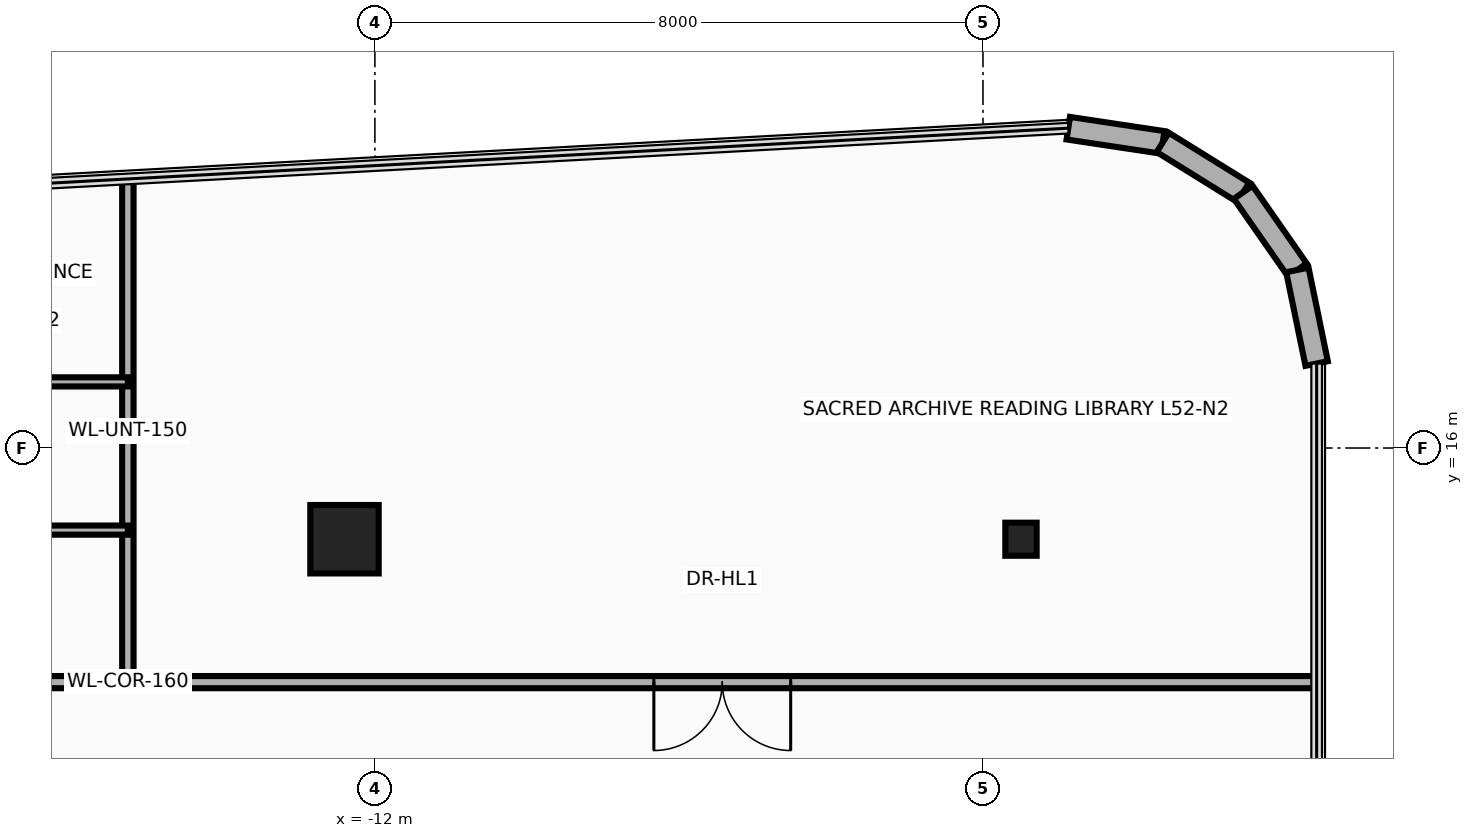
"""IFC4 building model, lengths in metres.
Left out: names, types, materials, properties, quantities, classifications, styles, units other than length and angle.
Written with IfcOpenShell. Run it as: python <this file> out.ifc"""

import sys

from ifc_helpers import new_model, si_unit, direction, frame, frame_2d, origin, origin_2d, place, context, subcontext, project, spatial, rectangle, i_section, extrude, source, transform, mapped, element, fill, save


model = new_model("IFC4")
c1 = context("Model", 3, precision=1e-05, world=origin(), true_north=direction((0.0, 1.0)))
c2 = subcontext(c1, "Body", "Model", "MODEL_VIEW")
j1 = project(units=[si_unit("LENGTHUNIT", "METRE"), si_unit("PLANEANGLEUNIT", "RADIAN")], contexts=[c1])
p1 = place(None, origin())
s1 = spatial("IfcSite", under=j1, at=p1, CompositionType="ELEMENT")
p2 = place(p1, origin())
s2 = spatial("IfcBuilding", under=s1, at=p2, CompositionType="ELEMENT")
p3 = place(p2, frame((0.0, 0.0, 205.5)))
s3 = spatial("IfcBuildingStorey", under=s2, at=p3, CompositionType="ELEMENT", Elevation=205.5)
m1 = source(origin(), c2, "Body", "SweptSolid", [
    extrude(rectangle(XDim=0.9, YDim=0.9, at=origin_2d()), origin(), (0.0, 0.0, 1.0), 3.5),
])
p4 = place(p3, frame((-12.4, 14.8, 0.0), z_axis=(0.0, 0.0, 1.0), x_axis=(1.0, 0.0, 0.0)))
e1 = element("IfcColumn", 1, at=p4, inside=s3, PredefinedType="COLUMN", context=c2, shape_type="MappedRepresentation", body=[
    mapped(m1, transform((0.0, 0.0, 0.0), x_axis=(1.0, 0.0, 0.0), y_axis=(0.0, 1.0, 0.0), z_axis=(0.0, 0.0, 1.0), scale=1.0)),
])
m2 = source(origin(), c2, "Body", "SweptSolid", [
    extrude(i_section(OverallWidth=0.412, OverallDepth=0.435, WebThickness=0.036, FlangeThickness=0.057, at=origin_2d()), origin(), (0.0, 0.0, 1.0), 3.5),
])
p5 = place(p3, frame((-3.5, 14.8, 0.0), z_axis=(0.0, 0.0, 1.0), x_axis=(1.0, 0.0, 0.0)))
e2 = element("IfcColumn", 2, at=p5, inside=s3, PredefinedType="COLUMN", context=c2, shape_type="MappedRepresentation", body=[
    mapped(m2, transform((0.0, 0.0, 0.0), x_axis=(1.0, 0.0, 0.0), y_axis=(0.0, 1.0, 0.0), z_axis=(0.0, 0.0, 1.0), scale=1.0)),
])
p6 = place(p3, frame((-2.878, 20.208, 0.0), z_axis=(0.0, 0.0, 1.0), x_axis=(0.988902138571, -0.148568369208, 0.0)))
e3 = element("IfcWall", 3, at=p6, inside=s3, PredefinedType="SOLIDWALL", context=c2, shape_type="SweptSolid", body=[
    extrude(rectangle(XDim=1.257, YDim=0.3, at=frame_2d((0.628, 0.0))), origin(), (0.0, 0.0, 1.0), 3.26),
])
p7 = place(p3, frame((-1.635, 20.021, 0.0), z_axis=(0.0, 0.0, 1.0), x_axis=(0.849646224094, -0.52735310171, 0.0)))
e4 = element("IfcWall", 4, at=p7, inside=s3, PredefinedType="SOLIDWALL", context=c2, shape_type="SweptSolid", body=[
    extrude(rectangle(XDim=1.245, YDim=0.3, at=frame_2d((0.623, 0.0))), origin(), (0.0, 0.0, 1.0), 3.26),
])
p8 = place(p3, frame((-0.576, 19.364, 0.0), z_axis=(0.0, 0.0, 1.0), x_axis=(0.572304219931, -0.820041389107, 0.0)))
e5 = element("IfcWall", 5, at=p8, inside=s3, PredefinedType="SOLIDWALL", context=c2, shape_type="SweptSolid", body=[
    extrude(rectangle(XDim=1.246, YDim=0.3, at=frame_2d((0.623, 0.0))), origin(), (0.0, 0.0, 1.0), 3.26),
])
p9 = place(p3, frame((0.136, 18.343, 0.0), z_axis=(0.0, 0.0, 1.0), x_axis=(0.201603599025, -0.979467196419, 0.0)))
e6 = element("IfcWall", 6, at=p9, inside=s3, PredefinedType="SOLIDWALL", context=c2, shape_type="SweptSolid", body=[
    extrude(rectangle(XDim=1.257, YDim=0.3, at=frame_2d((0.628, 0.0))), origin(), (0.0, 0.0, 1.0), 3.26),
])
p10 = place(p3, frame((-30.89, 12.92, 0.0), z_axis=(0.0, 0.0, 1.0), x_axis=(1.0, 0.0, 0.0)))
e7 = element("IfcWall", 7, at=p10, inside=s3, PredefinedType="PARTITIONING", context=c2, shape_type="SweptSolid", body=[
    extrude(rectangle(XDim=31.28, YDim=0.16, at=frame_2d((15.64, 0.0))), origin(), (0.0, 0.0, 1.0), 2.634),
])
p11 = place(p10, frame((2.347, 0.0, 0.0)))
e8 = element("IfcOpeningElement", 8, at=p11, cuts=e7, PredefinedType="OPENING", context=c2, shape_type="SweptSolid", body=[
    extrude(rectangle(XDim=0.95, YDim=2.15, at=frame_2d((0.475, 1.075))), frame((0.0, 0.095, 0.0), z_axis=(0.0, -1.0, 0.0), x_axis=(1.0, 0.0, 0.0)), (0.0, 0.0, 1.0), 0.19),
])
p12 = place(p10, frame((22.56, 0.0, 0.0)))
e9 = element("IfcOpeningElement", 9, at=p12, cuts=e7, PredefinedType="OPENING", context=c2, shape_type="SweptSolid", body=[
    extrude(rectangle(XDim=1.8, YDim=2.15, at=frame_2d((0.9, 1.075))), frame((0.0, 0.095, 0.0), z_axis=(0.0, -1.0, 0.0), x_axis=(1.0, 0.0, 0.0)), (0.0, 0.0, 1.0), 0.19),
])
p13 = place(p3, frame((-15.25, 12.92, 0.0), z_axis=(0.0, 0.0, 1.0), x_axis=(0.0, 1.0, 0.0)))
e10 = element("IfcWall", 10, at=p13, inside=s3, PredefinedType="PARTITIONING", context=c2, shape_type="SweptSolid", body=[
    extrude(rectangle(XDim=6.62, YDim=0.15, at=frame_2d((3.31, 0.0))), origin(), (0.0, 0.0, 1.0), 2.544),
])
p14 = place(p3, frame((-25.246, 14.92, 0.0), z_axis=(0.0, 0.0, 1.0), x_axis=(1.0, 0.0, 0.0)))
e11 = element("IfcWall", 11, at=p14, inside=s3, PredefinedType="PARTITIONING", context=c2, shape_type="SweptSolid", body=[
    extrude(rectangle(XDim=9.996, YDim=0.12, at=frame_2d((4.998, 0.0))), origin(), (0.0, 0.0, 1.0), 2.544),
])
p15 = place(p3, frame((-25.246, 16.87, 0.0), z_axis=(0.0, 0.0, 1.0), x_axis=(1.0, 0.0, 0.0)))
e12 = element("IfcWall", 12, at=p15, inside=s3, PredefinedType="PARTITIONING", context=c2, shape_type="SweptSolid", body=[
    extrude(rectangle(XDim=9.996, YDim=0.12, at=frame_2d((4.998, 0.0))), origin(), (0.0, 0.0, 1.0), 3.26),
])
p16 = place(p12, frame((1.8, 0.0, 0.0), z_axis=(0.0, 0.0, 1.0), x_axis=(-1.0, 0.0, 0.0)))
e13 = element("IfcDoor", 13, at=p16, inside=s3, OperationType="DOUBLE_DOOR_SINGLE_SWING", PredefinedType="DOOR", context=c2, shape_type="SweptSolid", body=[
    extrude(rectangle(XDim=1.8, YDim=2.15, at=frame_2d((0.9, 1.075))), frame((0.0, 0.025, 0.0), z_axis=(0.0, -1.0, 0.0), x_axis=(1.0, 0.0, 0.0)), (0.0, 0.0, 1.0), 0.05),
])
fill(e9, e13)
save(model, sys.argv[1])
